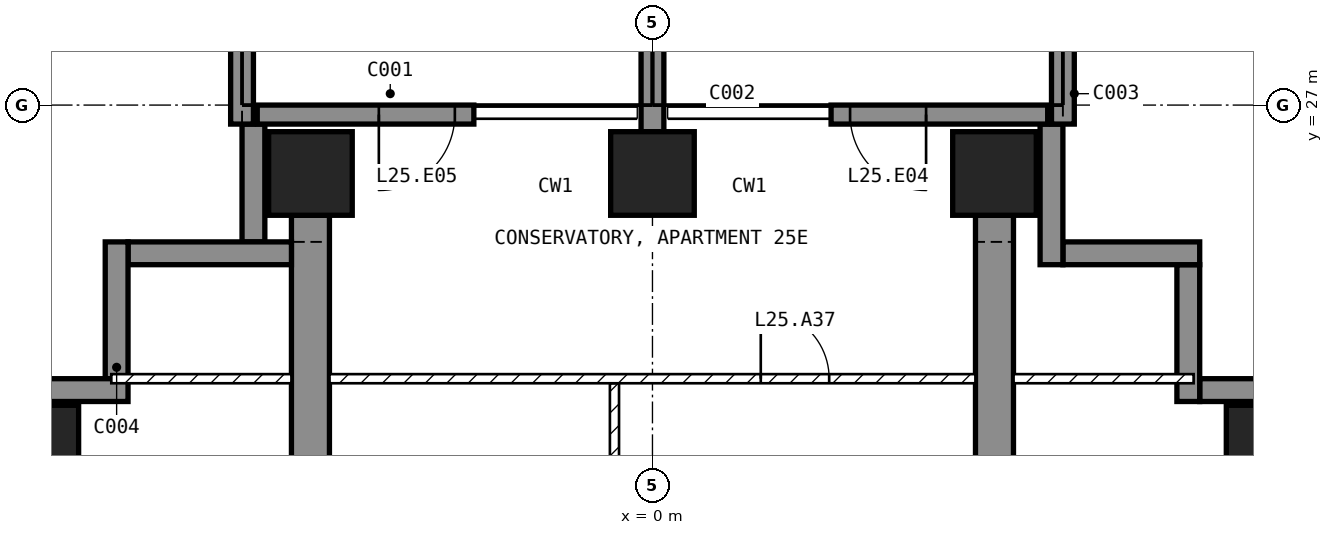
"""IFC4 building model, lengths in metres.
Left out: names, types, materials, properties, quantities, classifications, styles, units other than length and angle.
Written with IfcOpenShell. Run it as: python <this file> out.ifc"""

import sys

from ifc_helpers import new_model, si_unit, direction, frame, frame_2d, origin, origin_2d, place, context, subcontext, project, spatial, polyline, rectangle, outline, extrude, element, fill, save


model = new_model("IFC4")
c1 = context("Model", 3, precision=1e-05, world=origin(), true_north=direction((0.0, 1.0)))
c2 = subcontext(c1, "Body", "Model", "MODEL_VIEW")
j1 = project(units=[si_unit("LENGTHUNIT", "METRE"), si_unit("PLANEANGLEUNIT", "RADIAN")], contexts=[c1])
p1 = place(None, origin())
s1 = spatial("IfcSite", under=j1, at=p1, CompositionType="ELEMENT")
p2 = place(p1, origin())
s2 = spatial("IfcBuilding", under=s1, at=p2, CompositionType="ELEMENT")
p3 = place(p2, frame((0.0, 0.0, 109.4)))
s3 = spatial("IfcBuildingStorey", under=s2, at=p3, CompositionType="ELEMENT", Elevation=109.4)
for number, where, z_axis, x_axis in (
    (1, (-8.1, 22.5, -0.25), (0.0, 0.0, 1.0), (1.0, 0.0, 0.0)),
    (2, (-4.5, 26.1, -0.25), (0.0, 0.0, 1.0), (1.0, 0.0, 0.0)),
    (3, (0.0, 26.1, -0.25), (0.0, 0.0, 1.0), (1.0, 0.0, 0.0)),
    (4, (4.5, 26.1, -0.25), (0.0, 0.0, 1.0), (1.0, 0.0, 0.0)),
    (5, (8.1, 22.5, -0.25), (0.0, 0.0, 1.0), (1.0, 0.0, 0.0)),
):
    element("IfcColumn", number, at=place(p3, frame(where, z_axis=z_axis, x_axis=x_axis)), inside=s3, PredefinedType="COLUMN", context=c2, shape_type="SweptSolid", body=[
        extrude(rectangle(XDim=1.1, YDim=1.1, at=origin_2d()), origin(), (0.0, 0.0, 1.0), 3.5),
    ])
for number, where, z_axis, x_axis in (
    (6, (-4.75, 9.0, -0.25), (1.0, 0.0, 0.0), (0.0, 1.0, 0.0)),
    (7, (4.25, 9.0, -0.25), (1.0, 0.0, 0.0), (0.0, 1.0, 0.0)),
):
    element("IfcWall", number, at=place(p3, frame(where, z_axis=z_axis, x_axis=x_axis)), inside=s3, PredefinedType="SHEAR", context=c2, shape_type="SweptSolid", body=[
        extrude(outline(polyline([(0.0, 0.0), (2.1, 0.0), (2.1, 2.65), (4.5, 2.65), (4.5, 0.0), (9.9, 0.0), (9.9, 2.65), (12.3, 2.65), (12.3, 0.0), (16.55, 0.0), (16.55, 3.5), (0.0, 3.5), (0.0, 0.0)])), origin(), (0.0, 0.0, 1.0), 0.5),
    ])
p4 = place(p3, frame((5.2, 26.875, 0.0), z_axis=(0.0, 0.0, 1.0), x_axis=(-1.0, 0.0, 0.0)))
e8 = element("IfcWall", 8, at=p4, inside=s3, PredefinedType="SOLIDWALL", context=c2, shape_type="SweptSolid", body=[
    extrude(rectangle(XDim=2.85, YDim=0.25, at=frame_2d((1.425, 0.0))), origin(), (0.0, 0.0, 1.0), 3.25),
])
p5 = place(p4, frame((1.6, 0.0, 0.0)))
e9 = element("IfcOpeningElement", 9, at=p5, cuts=e8, PredefinedType="OPENING", context=c2, shape_type="SweptSolid", body=[
    extrude(rectangle(XDim=1.0, YDim=2.4, at=frame_2d((0.5, 1.2))), frame((0.0, 0.135, 0.0), z_axis=(0.0, -1.0, 0.0), x_axis=(1.0, 0.0, 0.0)), (0.0, 0.0, 1.0), 0.27),
])
p6 = place(p3, frame((-2.35, 26.875, 0.0), z_axis=(0.0, 0.0, 1.0), x_axis=(-1.0, 0.0, 0.0)))
e10 = element("IfcWall", 10, at=p6, inside=s3, PredefinedType="SOLIDWALL", context=c2, shape_type="SweptSolid", body=[
    extrude(rectangle(XDim=2.85, YDim=0.25, at=frame_2d((1.425, 0.0))), origin(), (0.0, 0.0, 1.0), 3.25),
])
p7 = place(p6, frame((0.25, 0.0, 0.0)))
e11 = element("IfcOpeningElement", 11, at=p7, cuts=e10, PredefinedType="OPENING", context=c2, shape_type="SweptSolid", body=[
    extrude(rectangle(XDim=1.0, YDim=2.4, at=frame_2d((0.5, 1.2))), frame((0.0, 0.135, 0.0), z_axis=(0.0, -1.0, 0.0), x_axis=(1.0, 0.0, 0.0)), (0.0, 0.0, 1.0), 0.27),
])
p8 = place(p3, frame((8.75, 23.25, 0.0), z_axis=(0.0, 0.0, 1.0), x_axis=(-1.0, 0.0, 0.0)))
e12 = element("IfcWall", 12, at=p8, inside=s3, PredefinedType="SOLIDWALL", context=c2, shape_type="SweptSolid", body=[
    extrude(rectangle(XDim=1.55, YDim=0.3, at=frame_2d((0.775, 0.0))), origin(), (0.0, 0.0, 1.0), 3.25),
])
p9 = place(p3, frame((7.05, 23.1, 0.0), z_axis=(0.0, 0.0, 1.0), x_axis=(0.0, 1.0, 0.0)))
e13 = element("IfcWall", 13, at=p9, inside=s3, PredefinedType="SOLIDWALL", context=c2, shape_type="SweptSolid", body=[
    extrude(rectangle(XDim=1.8, YDim=0.3, at=frame_2d((0.9, 0.0))), origin(), (0.0, 0.0, 1.0), 3.25),
])
p10 = place(p3, frame((7.2, 25.05, 0.0), z_axis=(0.0, 0.0, 1.0), x_axis=(-1.0, 0.0, 0.0)))
e14 = element("IfcWall", 14, at=p10, inside=s3, PredefinedType="SOLIDWALL", context=c2, shape_type="SweptSolid", body=[
    extrude(rectangle(XDim=1.8, YDim=0.3, at=frame_2d((0.9, 0.0))), origin(), (0.0, 0.0, 1.0), 3.25),
])
p11 = place(p3, frame((5.25, 24.9, 0.0), z_axis=(0.0, 0.0, 1.0), x_axis=(0.0, 1.0, 0.0)))
e15 = element("IfcWall", 15, at=p11, inside=s3, PredefinedType="SOLIDWALL", context=c2, shape_type="SweptSolid", body=[
    extrude(rectangle(XDim=1.85, YDim=0.3, at=frame_2d((0.925, 0.0))), origin(), (0.0, 0.0, 1.0), 3.25),
])
p12 = place(p3, frame((-5.25, 26.75, 0.0), z_axis=(0.0, 0.0, 1.0), x_axis=(0.0, -1.0, 0.0)))
e16 = element("IfcWall", 16, at=p12, inside=s3, PredefinedType="SOLIDWALL", context=c2, shape_type="SweptSolid", body=[
    extrude(rectangle(XDim=1.55, YDim=0.3, at=frame_2d((0.775, 0.0))), origin(), (0.0, 0.0, 1.0), 3.25),
])
p13 = place(p3, frame((-4.75, 25.05, 0.0), z_axis=(0.0, 0.0, 1.0), x_axis=(-1.0, 0.0, 0.0)))
e17 = element("IfcWall", 17, at=p13, inside=s3, PredefinedType="SOLIDWALL", context=c2, shape_type="SweptSolid", body=[
    extrude(rectangle(XDim=2.15, YDim=0.3, at=frame_2d((1.075, 0.0))), origin(), (0.0, 0.0, 1.0), 3.25),
])
p14 = place(p3, frame((-7.05, 25.2, 0.0), z_axis=(0.0, 0.0, 1.0), x_axis=(0.0, -1.0, 0.0)))
e18 = element("IfcWall", 18, at=p14, inside=s3, PredefinedType="SOLIDWALL", context=c2, shape_type="SweptSolid", body=[
    extrude(rectangle(XDim=1.8, YDim=0.3, at=frame_2d((0.9, 0.0))), origin(), (0.0, 0.0, 1.0), 3.25),
])
p15 = place(p3, frame((-6.9, 23.25, 0.0), z_axis=(0.0, 0.0, 1.0), x_axis=(-1.0, 0.0, 0.0)))
e19 = element("IfcWall", 19, at=p15, inside=s3, PredefinedType="SOLIDWALL", context=c2, shape_type="SweptSolid", body=[
    extrude(rectangle(XDim=1.85, YDim=0.3, at=frame_2d((0.925, 0.0))), origin(), (0.0, 0.0, 1.0), 3.25),
])
p16 = place(p3, frame((-5.4, 26.75, 0.0), z_axis=(0.0, 0.0, 1.0), x_axis=(0.0, 1.0, 0.0)))
e20 = element("IfcWall", 20, at=p16, inside=s3, PredefinedType="SOLIDWALL", context=c2, shape_type="SweptSolid", body=[
    extrude(rectangle(XDim=2.95, YDim=0.3, at=frame_2d((1.475, 0.0))), origin(), (0.0, 0.0, 1.0), 3.25),
])
p17 = place(p3, frame((0.0, 26.65, 0.0), z_axis=(0.0, 0.0, 1.0), x_axis=(0.0, 1.0, 0.0)))
e21 = element("IfcWall", 21, at=p17, inside=s3, PredefinedType="SOLIDWALL", context=c2, shape_type="SweptSolid", body=[
    extrude(rectangle(XDim=3.05, YDim=0.3, at=frame_2d((1.525, 0.0))), origin(), (0.0, 0.0, 1.0), 3.25),
])
p18 = place(p3, frame((5.4, 26.75, 0.0), z_axis=(0.0, 0.0, 1.0), x_axis=(0.0, 1.0, 0.0)))
e22 = element("IfcWall", 22, at=p18, inside=s3, PredefinedType="SOLIDWALL", context=c2, shape_type="SweptSolid", body=[
    extrude(rectangle(XDim=2.95, YDim=0.3, at=frame_2d((1.475, 0.0))), origin(), (0.0, 0.0, 1.0), 3.25),
])
p19 = place(p3, frame((-0.5, 18.96, 0.0), z_axis=(0.0, 0.0, 1.0), x_axis=(0.0, 1.0, 0.0)))
e23 = element("IfcWall", 23, at=p19, inside=s3, PredefinedType="PARTITIONING", context=c2, shape_type="SweptSolid", body=[
    extrude(rectangle(XDim=4.38, YDim=0.12, at=frame_2d((2.19, 0.0))), origin(), (0.0, 0.0, 1.0), 3.25),
])
p20 = place(p19, frame((1.74, 0.0, 0.0)))
e24 = element("IfcOpeningElement", 24, at=p20, cuts=e23, PredefinedType="OPENING", context=c2, shape_type="SweptSolid", body=[
    extrude(rectangle(XDim=0.9, YDim=2.1, at=frame_2d((0.45, 1.05))), frame((0.0, 0.07, 0.0), z_axis=(0.0, -1.0, 0.0), x_axis=(1.0, 0.0, 0.0)), (0.0, 0.0, 1.0), 0.14),
])
p21 = place(p3, frame((-4.25, 23.4, 0.0), z_axis=(0.0, 0.0, 1.0), x_axis=(1.0, 0.0, 0.0)))
e25 = element("IfcWall", 25, at=p21, inside=s3, PredefinedType="PARTITIONING", context=c2, shape_type="SweptSolid", body=[
    extrude(rectangle(XDim=8.5, YDim=0.12, at=frame_2d((4.25, 0.0))), origin(), (0.0, 0.0, 1.0), 3.25),
])
p22 = place(p21, frame((5.675, 0.0, 0.0)))
e26 = element("IfcOpeningElement", 26, at=p22, cuts=e25, PredefinedType="OPENING", context=c2, shape_type="SweptSolid", body=[
    extrude(rectangle(XDim=0.9, YDim=2.1, at=frame_2d((0.45, 1.05))), frame((0.0, 0.07, 0.0), z_axis=(0.0, -1.0, 0.0), x_axis=(1.0, 0.0, 0.0)), (0.0, 0.0, 1.0), 0.14),
])
for number, where, z_axis, x_axis in (
    (27, (4.75, 23.4, 0.0), (0.0, 0.0, 1.0), (1.0, 0.0, 0.0)),
    (28, (-7.12, 23.4, 0.0), (0.0, 0.0, 1.0), (1.0, 0.0, 0.0)),
):
    element("IfcWall", number, at=place(p3, frame(where, z_axis=z_axis, x_axis=x_axis)), inside=s3, PredefinedType="PARTITIONING", context=c2, shape_type="SweptSolid", body=[
        extrude(rectangle(XDim=2.37, YDim=0.12, at=frame_2d((1.185, 0.0))), origin(), (0.0, 0.0, 1.0), 3.25),
    ])
p23 = place(p5, origin())
e29 = element("IfcDoor", 29, at=p23, inside=s3, OperationType="SINGLE_SWING_LEFT", PredefinedType="DOOR", context=c2, shape_type="SweptSolid", body=[
    extrude(rectangle(XDim=1.0, YDim=2.4, at=frame_2d((0.5, 1.2))), frame((0.0, 0.025, 0.0), z_axis=(0.0, -1.0, 0.0), x_axis=(1.0, 0.0, 0.0)), (0.0, 0.0, 1.0), 0.05),
])
fill(e9, e29)
p24 = place(p7, origin())
e30 = element("IfcDoor", 30, at=p24, inside=s3, OperationType="SINGLE_SWING_RIGHT", PredefinedType="DOOR", context=c2, shape_type="SweptSolid", body=[
    extrude(rectangle(XDim=1.0, YDim=2.4, at=frame_2d((0.5, 1.2))), frame((0.0, 0.025, 0.0), z_axis=(0.0, -1.0, 0.0), x_axis=(1.0, 0.0, 0.0)), (0.0, 0.0, 1.0), 0.05),
])
fill(e11, e30)
p25 = place(p22, origin())
e31 = element("IfcDoor", 31, at=p25, inside=s3, OperationType="SINGLE_SWING_LEFT", PredefinedType="DOOR", context=c2, shape_type="SweptSolid", body=[
    extrude(rectangle(XDim=0.9, YDim=2.1, at=frame_2d((0.45, 1.05))), frame((0.0, 0.025, 0.0), z_axis=(0.0, -1.0, 0.0), x_axis=(1.0, 0.0, 0.0)), (0.0, 0.0, 1.0), 0.05),
])
fill(e26, e31)
save(model, sys.argv[1])
